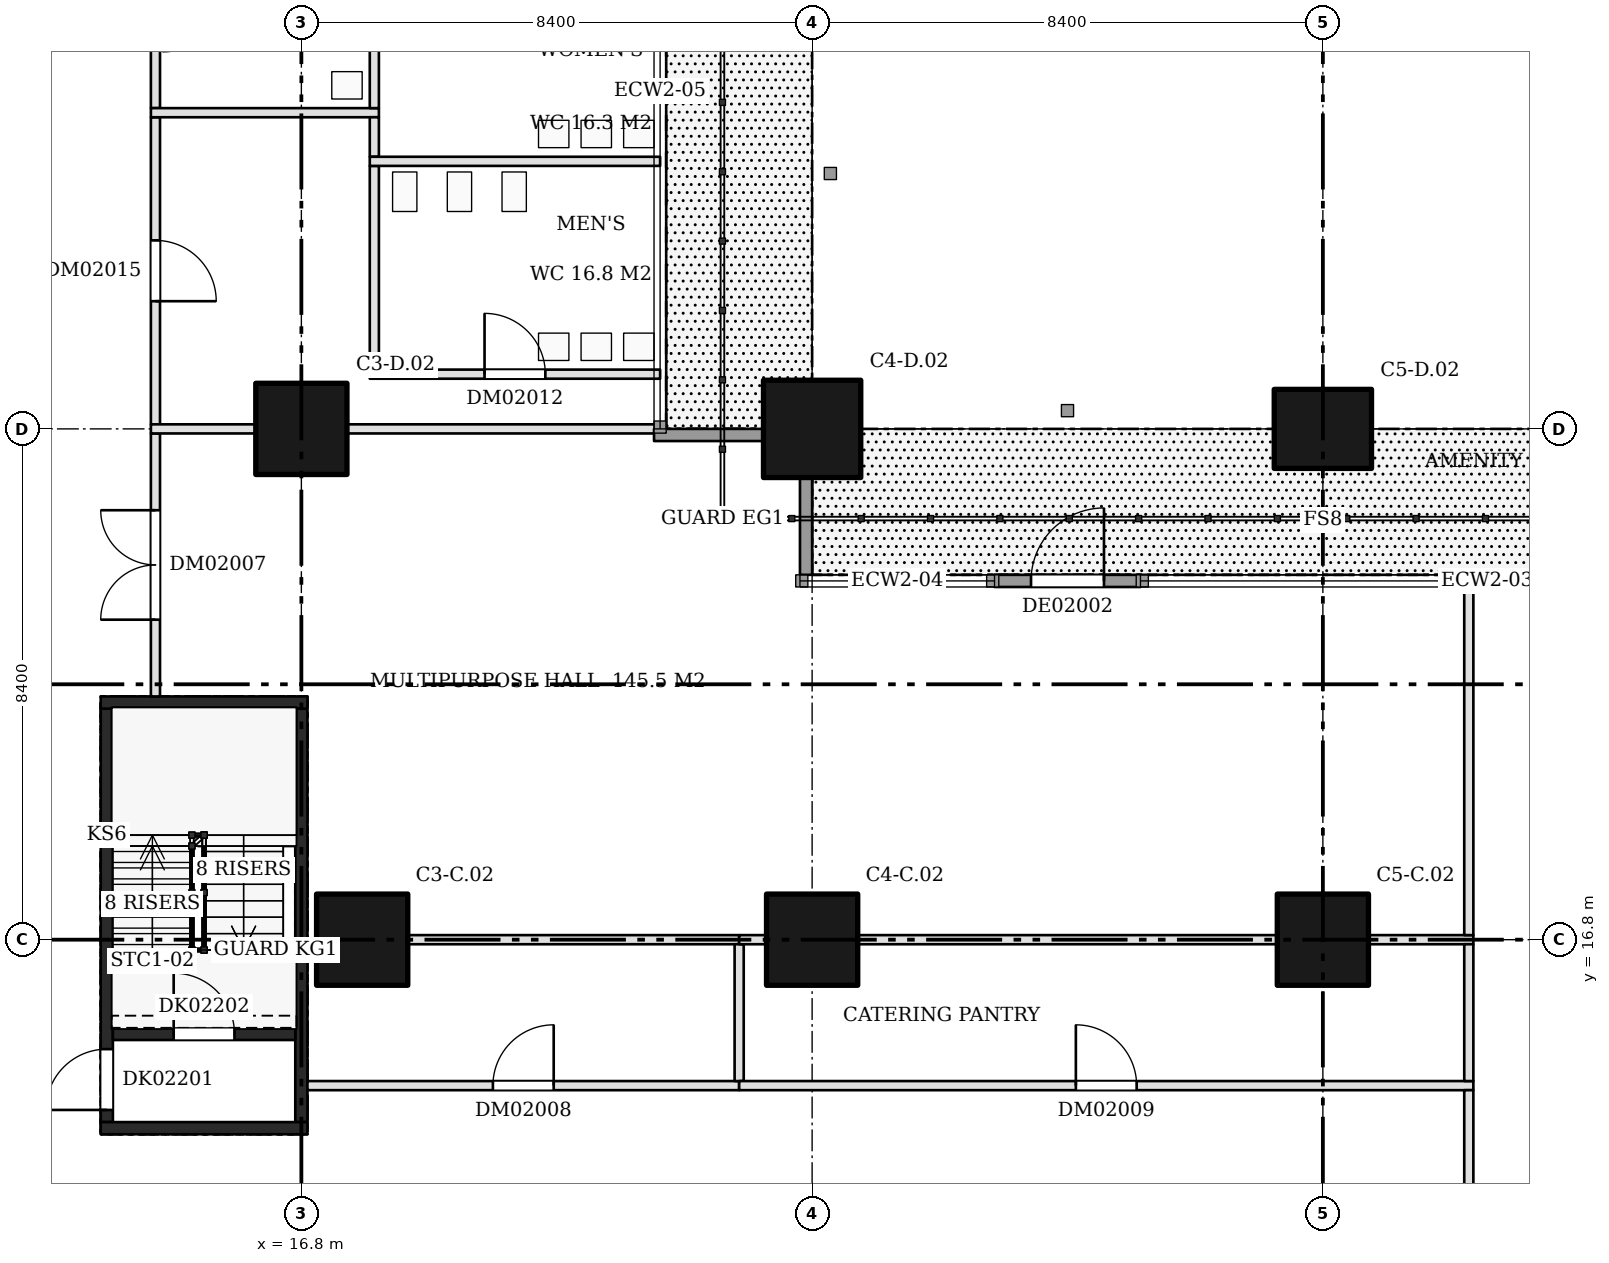
"""IFC4 building model, lengths in metres.
Left out: names, types, materials, properties, quantities, classifications, styles, units other than length and angle.
Written with IfcOpenShell. Run it as: python <this file> out.ifc"""

import sys

from ifc_helpers import new_model, si_unit, direction, frame, frame_2d, origin, origin_2d, place, context, subcontext, project, spatial, rectangle, extrude, element, fill, save


model = new_model("IFC4")
c1 = context("Model", 3, precision=1e-05, world=origin(), true_north=direction((0.0, 1.0)))
c2 = subcontext(c1, "Body", "Model", "MODEL_VIEW")
j1 = project(units=[si_unit("LENGTHUNIT", "METRE"), si_unit("PLANEANGLEUNIT", "RADIAN")], contexts=[c1])
p1 = place(None, origin())
s1 = spatial("IfcSite", under=j1, at=p1, CompositionType="ELEMENT")
p2 = place(p1, origin())
s2 = spatial("IfcBuilding", under=s1, at=p2, CompositionType="ELEMENT")
p3 = place(p2, frame((0.0, 0.0, 14.4)))
s3 = spatial("IfcBuildingStorey", under=s2, at=p3, CompositionType="ELEMENT", Elevation=14.4)
for number, where, z_axis, x_axis in (
    (1, (17.8, 16.8, 0.0), (0.0, 0.0, 1.0), (1.0, 0.0, 0.0)),
    (2, (16.8, 25.2, 0.0), (0.0, 0.0, 1.0), (1.0, 0.0, 0.0)),
    (3, (25.2, 16.8, 0.0), (0.0, 0.0, 1.0), (1.0, 0.0, 0.0)),
):
    element("IfcColumn", number, at=place(p3, frame(where, z_axis=z_axis, x_axis=x_axis)), inside=s3, PredefinedType="COLUMN", context=c2, shape_type="SweptSolid", body=[
        extrude(rectangle(XDim=1.5, YDim=1.5, at=origin_2d()), origin(), (0.0, 0.0, 1.0), 5.1),
    ])
p4 = place(p3, frame((25.2, 25.2, 0.0), z_axis=(0.0, 0.0, 1.0), x_axis=(1.0, 0.0, 0.0)))
e4 = element("IfcColumn", 4, at=p4, inside=s3, PredefinedType="COLUMN", context=c2, shape_type="SweptSolid", body=[
    extrude(rectangle(XDim=1.6, YDim=1.6, at=origin_2d()), origin(), (0.0, 0.0, 1.0), 5.1),
])
p5 = place(p3, frame((33.6, 16.8, 0.0), z_axis=(0.0, 0.0, 1.0), x_axis=(1.0, 0.0, 0.0)))
e5 = element("IfcColumn", 5, at=p5, inside=s3, PredefinedType="COLUMN", context=c2, shape_type="SweptSolid", body=[
    extrude(rectangle(XDim=1.5, YDim=1.5, at=origin_2d()), origin(), (0.0, 0.0, 1.0), 5.1),
])
p6 = place(p3, frame((33.6, 25.2, 0.0), z_axis=(0.0, 0.0, 1.0), x_axis=(1.0, 0.0, 0.0)))
e6 = element("IfcColumn", 6, at=p6, inside=s3, PredefinedType="COLUMN", context=c2, shape_type="SweptSolid", body=[
    extrude(rectangle(XDim=1.6, YDim=1.3, at=origin_2d()), origin(), (0.0, 0.0, 1.0), 5.1),
])
p7 = place(p3, frame((13.6, 13.8, 0.0), z_axis=(0.0, 0.0, 1.0), x_axis=(0.0, 1.0, 0.0)))
e7 = element("IfcWall", 7, at=p7, inside=s3, PredefinedType="SHEAR", context=c2, shape_type="SweptSolid", body=[
    extrude(rectangle(XDim=6.8, YDim=0.2, at=frame_2d((3.4, 0.0))), origin(), (0.0, 0.0, 1.0), 5.1),
])
p8 = place(p7, frame((0.2, 0.0, 0.0)))
e8 = element("IfcOpeningElement", 8, at=p8, cuts=e7, PredefinedType="OPENING", context=c2, shape_type="SweptSolid", body=[
    extrude(rectangle(XDim=1.0, YDim=2.1, at=frame_2d((0.5, 1.05))), frame((0.0, 0.11, 0.0), z_axis=(0.0, -1.0, 0.0), x_axis=(1.0, 0.0, 0.0)), (0.0, 0.0, 1.0), 0.22),
])
p9 = place(p3, frame((16.8, 13.8, 0.0), z_axis=(0.0, 0.0, 1.0), x_axis=(0.0, 1.0, 0.0)))
e9 = element("IfcWall", 9, at=p9, inside=s3, PredefinedType="SHEAR", context=c2, shape_type="SweptSolid", body=[
    extrude(rectangle(XDim=6.8, YDim=0.2, at=frame_2d((3.4, 0.0))), origin(), (0.0, 0.0, 1.0), 5.1),
])
for number, where, z_axis, x_axis in (
    (10, (13.5, 13.7, 0.0), (0.0, 0.0, 1.0), (1.0, 0.0, 0.0)),
    (11, (13.5, 20.7, 0.0), (0.0, 0.0, 1.0), (1.0, 0.0, 0.0)),
):
    element("IfcWall", number, at=place(p3, frame(where, z_axis=z_axis, x_axis=x_axis)), inside=s3, PredefinedType="SHEAR", context=c2, shape_type="SweptSolid", body=[
        extrude(rectangle(XDim=3.4, YDim=0.2, at=frame_2d((1.7, 0.0))), origin(), (0.0, 0.0, 1.0), 5.1),
    ])
p10 = place(p3, frame((13.7, 15.25, 0.0), z_axis=(0.0, 0.0, 1.0), x_axis=(1.0, 0.0, 0.0)))
e12 = element("IfcWall", 12, at=p10, inside=s3, PredefinedType="SHEAR", context=c2, shape_type="SweptSolid", body=[
    extrude(rectangle(XDim=3.0, YDim=0.2, at=frame_2d((1.5, 0.0))), origin(), (0.0, 0.0, 1.0), 5.1),
])
p11 = place(p10, frame((1.0, 0.0, 0.0)))
e13 = element("IfcOpeningElement", 13, at=p11, cuts=e12, PredefinedType="OPENING", context=c2, shape_type="SweptSolid", body=[
    extrude(rectangle(XDim=1.0, YDim=2.1, at=frame_2d((0.5, 1.05))), frame((0.0, 0.11, 0.0), z_axis=(0.0, -1.0, 0.0), x_axis=(1.0, 0.0, 0.0)), (0.0, 0.0, 1.0), 0.22),
])
p12 = place(p3, frame((14.4, 20.8, 0.0), z_axis=(0.0, 0.0, 1.0), x_axis=(0.0, 1.0, 0.0)))
e14 = element("IfcWall", 14, at=p12, inside=s3, PredefinedType="PARTITIONING", context=c2, shape_type="SweptSolid", body=[
    extrude(rectangle(XDim=4.325, YDim=0.15, at=frame_2d((2.163, 0.0))), origin(), (0.0, 0.0, 1.0), 5.1),
])
p13 = place(p12, frame((1.262, 0.0, 0.0)))
e15 = element("IfcOpeningElement", 15, at=p13, cuts=e14, PredefinedType="OPENING", context=c2, shape_type="SweptSolid", body=[
    extrude(rectangle(XDim=1.8, YDim=2.1, at=frame_2d((0.9, 1.05))), frame((0.0, 0.085, 0.0), z_axis=(0.0, -1.0, 0.0), x_axis=(1.0, 0.0, 0.0)), (0.0, 0.0, 1.0), 0.17),
])
p14 = place(p3, frame((14.4, 25.275, 0.0), z_axis=(0.0, 0.0, 1.0), x_axis=(0.0, 1.0, 0.0)))
e16 = element("IfcWall", 16, at=p14, inside=s3, PredefinedType="PARTITIONING", context=c2, shape_type="SweptSolid", body=[
    extrude(rectangle(XDim=5.05, YDim=0.15, at=frame_2d((2.525, 0.0))), origin(), (0.0, 0.0, 1.0), 5.1),
])
p15 = place(p14, frame((2.025, 0.0, 0.0)))
e17 = element("IfcOpeningElement", 17, at=p15, cuts=e16, PredefinedType="OPENING", context=c2, shape_type="SweptSolid", body=[
    extrude(rectangle(XDim=1.0, YDim=2.1, at=frame_2d((0.5, 1.05))), frame((0.0, 0.085, 0.0), z_axis=(0.0, -1.0, 0.0), x_axis=(1.0, 0.0, 0.0)), (0.0, 0.0, 1.0), 0.17),
])
p16 = place(p3, frame((14.325, 25.2, 0.0), z_axis=(0.0, 0.0, 1.0), x_axis=(1.0, 0.0, 0.0)))
e18 = element("IfcWall", 18, at=p16, inside=s3, PredefinedType="PARTITIONING", context=c2, shape_type="SweptSolid", body=[
    extrude(rectangle(XDim=1.725, YDim=0.15, at=frame_2d((0.863, 0.0))), origin(), (0.0, 0.0, 1.0), 5.1),
])
p17 = place(p3, frame((17.55, 25.2, 0.0), z_axis=(0.0, 0.0, 1.0), x_axis=(1.0, 0.0, 0.0)))
e19 = element("IfcWall", 19, at=p17, inside=s3, PredefinedType="PARTITIONING", context=c2, shape_type="SweptSolid", body=[
    extrude(rectangle(XDim=5.15, YDim=0.15, at=frame_2d((2.575, 0.0))), origin(), (0.0, 0.0, 1.0), 5.1),
])
p18 = place(p3, frame((14.4, 30.475, 0.0), z_axis=(0.0, 0.0, 1.0), x_axis=(0.0, 1.0, 0.0)))
e20 = element("IfcWall", 20, at=p18, inside=s3, PredefinedType="PARTITIONING", context=c2, shape_type="SweptSolid", body=[
    extrude(rectangle(XDim=1.85, YDim=0.15, at=frame_2d((0.925, 0.0))), origin(), (0.0, 0.0, 1.0), 5.1),
])
p19 = place(p3, frame((14.325, 30.4, 0.0), z_axis=(0.0, 0.0, 1.0), x_axis=(1.0, 0.0, 0.0)))
e21 = element("IfcWall", 21, at=p19, inside=s3, PredefinedType="PARTITIONING", context=c2, shape_type="SweptSolid", body=[
    extrude(rectangle(XDim=3.75, YDim=0.15, at=frame_2d((1.875, 0.0))), origin(), (0.0, 0.0, 1.0), 5.1),
])
p20 = place(p3, frame((16.9, 14.4, 0.0), z_axis=(0.0, 0.0, 1.0), x_axis=(1.0, 0.0, 0.0)))
e22 = element("IfcWall", 22, at=p20, inside=s3, PredefinedType="PARTITIONING", context=c2, shape_type="SweptSolid", body=[
    extrude(rectangle(XDim=7.1, YDim=0.15, at=frame_2d((3.55, 0.0))), origin(), (0.0, 0.0, 1.0), 5.1),
])
p21 = place(p20, frame((3.05, 0.0, 0.0)))
e23 = element("IfcOpeningElement", 23, at=p21, cuts=e22, PredefinedType="OPENING", context=c2, shape_type="SweptSolid", body=[
    extrude(rectangle(XDim=1.0, YDim=2.1, at=frame_2d((0.5, 1.05))), frame((0.0, 0.085, 0.0), z_axis=(0.0, -1.0, 0.0), x_axis=(1.0, 0.0, 0.0)), (0.0, 0.0, 1.0), 0.17),
])
p22 = place(p3, frame((18.55, 16.8, 0.0), z_axis=(0.0, 0.0, 1.0), x_axis=(1.0, 0.0, 0.0)))
e24 = element("IfcWall", 24, at=p22, inside=s3, PredefinedType="PARTITIONING", context=c2, shape_type="SweptSolid", body=[
    extrude(rectangle(XDim=5.45, YDim=0.15, at=frame_2d((2.725, 0.0))), origin(), (0.0, 0.0, 1.0), 5.1),
])
p23 = place(p3, frame((18.0, 26.175, 0.0), z_axis=(0.0, 0.0, 1.0), x_axis=(0.0, 1.0, 0.0)))
e25 = element("IfcWall", 25, at=p23, inside=s3, PredefinedType="PARTITIONING", context=c2, shape_type="SweptSolid", body=[
    extrude(rectangle(XDim=3.35, YDim=0.15, at=frame_2d((1.675, 0.0))), origin(), (0.0, 0.0, 1.0), 5.1),
])
p24 = place(p3, frame((17.925, 26.1, 0.0), z_axis=(0.0, 0.0, 1.0), x_axis=(1.0, 0.0, 0.0)))
e26 = element("IfcWall", 26, at=p24, inside=s3, PredefinedType="PARTITIONING", context=c2, shape_type="SweptSolid", body=[
    extrude(rectangle(XDim=4.775, YDim=0.15, at=frame_2d((2.387, 0.0))), origin(), (0.0, 0.0, 1.0), 5.1),
])
p25 = place(p24, frame((1.887, 0.0, 0.0)))
e27 = element("IfcOpeningElement", 27, at=p25, cuts=e26, PredefinedType="OPENING", context=c2, shape_type="SweptSolid", body=[
    extrude(rectangle(XDim=1.0, YDim=2.1, at=frame_2d((0.5, 1.05))), frame((0.0, 0.085, 0.0), z_axis=(0.0, -1.0, 0.0), x_axis=(1.0, 0.0, 0.0)), (0.0, 0.0, 1.0), 0.17),
])
p26 = place(p3, frame((18.0, 29.675, 0.0), z_axis=(0.0, 0.0, 1.0), x_axis=(0.0, 1.0, 0.0)))
e28 = element("IfcWall", 28, at=p26, inside=s3, PredefinedType="PARTITIONING", context=c2, shape_type="SweptSolid", body=[
    extrude(rectangle(XDim=0.65, YDim=0.15, at=frame_2d((0.325, 0.0))), origin(), (0.0, 0.0, 1.0), 5.1),
])
p27 = place(p3, frame((17.925, 29.6, 0.0), z_axis=(0.0, 0.0, 1.0), x_axis=(1.0, 0.0, 0.0)))
e29 = element("IfcWall", 29, at=p27, inside=s3, PredefinedType="PARTITIONING", context=c2, shape_type="SweptSolid", body=[
    extrude(rectangle(XDim=4.775, YDim=0.15, at=frame_2d((2.387, 0.0))), origin(), (0.0, 0.0, 1.0), 5.1),
])
p28 = place(p3, frame((18.0, 30.475, 0.0), z_axis=(0.0, 0.0, 1.0), x_axis=(0.0, 1.0, 0.0)))
e30 = element("IfcWall", 30, at=p28, inside=s3, PredefinedType="PARTITIONING", context=c2, shape_type="SweptSolid", body=[
    extrude(rectangle(XDim=1.85, YDim=0.15, at=frame_2d((0.925, 0.0))), origin(), (0.0, 0.0, 1.0), 5.1),
])
p29 = place(p3, frame((24.0, 14.475, 0.0), z_axis=(0.0, 0.0, 1.0), x_axis=(0.0, 1.0, 0.0)))
e31 = element("IfcWall", 31, at=p29, inside=s3, PredefinedType="PARTITIONING", context=c2, shape_type="SweptSolid", body=[
    extrude(rectangle(XDim=2.25, YDim=0.15, at=frame_2d((1.125, 0.0))), origin(), (0.0, 0.0, 1.0), 5.1),
])
p30 = place(p3, frame((24.0, 14.4, 0.0), z_axis=(0.0, 0.0, 1.0), x_axis=(1.0, 0.0, 0.0)))
e32 = element("IfcWall", 32, at=p30, inside=s3, PredefinedType="PARTITIONING", context=c2, shape_type="SweptSolid", body=[
    extrude(rectangle(XDim=12.075, YDim=0.15, at=frame_2d((6.038, 0.0))), origin(), (0.0, 0.0, 1.0), 5.1),
])
p31 = place(p30, frame((5.538, 0.0, 0.0)))
e33 = element("IfcOpeningElement", 33, at=p31, cuts=e32, PredefinedType="OPENING", context=c2, shape_type="SweptSolid", body=[
    extrude(rectangle(XDim=1.0, YDim=2.1, at=frame_2d((0.5, 1.05))), frame((0.0, 0.085, 0.0), z_axis=(0.0, -1.0, 0.0), x_axis=(1.0, 0.0, 0.0)), (0.0, 0.0, 1.0), 0.17),
])
p32 = place(p3, frame((24.0, 16.8, 0.0), z_axis=(0.0, 0.0, 1.0), x_axis=(1.0, 0.0, 0.0)))
e34 = element("IfcWall", 34, at=p32, inside=s3, PredefinedType="PARTITIONING", context=c2, shape_type="SweptSolid", body=[
    extrude(rectangle(XDim=0.45, YDim=0.15, at=frame_2d((0.225, 0.0))), origin(), (0.0, 0.0, 1.0), 5.1),
])
p33 = place(p3, frame((25.95, 16.8, 0.0), z_axis=(0.0, 0.0, 1.0), x_axis=(1.0, 0.0, 0.0)))
e35 = element("IfcWall", 35, at=p33, inside=s3, PredefinedType="PARTITIONING", context=c2, shape_type="SweptSolid", body=[
    extrude(rectangle(XDim=6.9, YDim=0.15, at=frame_2d((3.45, 0.0))), origin(), (0.0, 0.0, 1.0), 5.1),
])
p34 = place(p3, frame((34.35, 16.8, 0.0), z_axis=(0.0, 0.0, 1.0), x_axis=(1.0, 0.0, 0.0)))
e36 = element("IfcWall", 36, at=p34, inside=s3, PredefinedType="PARTITIONING", context=c2, shape_type="SweptSolid", body=[
    extrude(rectangle(XDim=1.725, YDim=0.15, at=frame_2d((0.862, 0.0))), origin(), (0.0, 0.0, 1.0), 5.1),
])
p35 = place(p3, frame((36.0, 10.875, 0.0), z_axis=(0.0, 0.0, 1.0), x_axis=(0.0, 1.0, 0.0)))
e37 = element("IfcWall", 37, at=p35, inside=s3, PredefinedType="PARTITIONING", context=c2, shape_type="SweptSolid", body=[
    extrude(rectangle(XDim=3.45, YDim=0.15, at=frame_2d((1.725, 0.0))), origin(), (0.0, 0.0, 1.0), 5.1),
])
p36 = place(p3, frame((36.0, 14.475, 0.0), z_axis=(0.0, 0.0, 1.0), x_axis=(0.0, 1.0, 0.0)))
e38 = element("IfcWall", 38, at=p36, inside=s3, PredefinedType="PARTITIONING", context=c2, shape_type="SweptSolid", body=[
    extrude(rectangle(XDim=2.25, YDim=0.15, at=frame_2d((1.125, 0.0))), origin(), (0.0, 0.0, 1.0), 5.1),
])
p37 = place(p3, frame((36.0, 16.875, 0.0), z_axis=(0.0, 0.0, 1.0), x_axis=(0.0, 1.0, 0.0)))
e39 = element("IfcWall", 39, at=p37, inside=s3, PredefinedType="PARTITIONING", context=c2, shape_type="SweptSolid", body=[
    extrude(rectangle(XDim=5.825, YDim=0.15, at=frame_2d((2.913, 0.0))), origin(), (0.0, 0.0, 1.0), 5.1),
])
p38 = place(p3, frame((30.6, 22.7, 0.0), z_axis=(0.0, 0.0, 1.0), x_axis=(-1.0, 0.0, 0.0)))
e40 = element("IfcWall", 40, at=p38, inside=s3, PredefinedType="SOLIDWALL", context=c2, shape_type="SweptSolid", body=[
    extrude(rectangle(XDim=2.4, YDim=0.2, at=frame_2d((1.2, 0.0))), origin(), (0.0, 0.0, 1.0), 5.1),
])
p39 = place(p38, frame((0.6, 0.0, 0.0)))
e41 = element("IfcOpeningElement", 41, at=p39, cuts=e40, PredefinedType="OPENING", context=c2, shape_type="SweptSolid", body=[
    extrude(rectangle(XDim=1.2, YDim=2.4, at=frame_2d((0.6, 1.2))), frame((0.0, 0.11, 0.0), z_axis=(0.0, -1.0, 0.0), x_axis=(1.0, 0.0, 0.0)), (0.0, 0.0, 1.0), 0.22),
])
p40 = place(p3, frame((25.1, 22.8, 0.0), z_axis=(0.0, 0.0, 1.0), x_axis=(0.0, 1.0, 0.0)))
e42 = element("IfcWall", 42, at=p40, inside=s3, PredefinedType="SOLIDWALL", context=c2, shape_type="SweptSolid", body=[
    extrude(rectangle(XDim=1.6, YDim=0.2, at=frame_2d((0.8, 0.0))), origin(), (0.0, 0.0, 1.0), 5.1),
])
p41 = place(p3, frame((24.4, 25.1, 0.0), z_axis=(0.0, 0.0, 1.0), x_axis=(-1.0, 0.0, 0.0)))
e43 = element("IfcWall", 43, at=p41, inside=s3, PredefinedType="SOLIDWALL", context=c2, shape_type="SweptSolid", body=[
    extrude(rectangle(XDim=1.8, YDim=0.2, at=frame_2d((0.9, 0.0))), origin(), (0.0, 0.0, 1.0), 5.1),
])
p42 = place(p8, origin())
e44 = element("IfcDoor", 44, at=p42, inside=s3, OperationType="SINGLE_SWING_LEFT", PredefinedType="DOOR", context=c2, shape_type="SweptSolid", body=[
    extrude(rectangle(XDim=1.0, YDim=2.1, at=frame_2d((0.5, 1.05))), frame((0.0, 0.025, 0.0), z_axis=(0.0, -1.0, 0.0), x_axis=(1.0, 0.0, 0.0)), (0.0, 0.0, 1.0), 0.05),
])
fill(e8, e44)
p43 = place(p11, origin())
e45 = element("IfcDoor", 45, at=p43, inside=s3, OperationType="SINGLE_SWING_LEFT", PredefinedType="DOOR", context=c2, shape_type="SweptSolid", body=[
    extrude(rectangle(XDim=1.0, YDim=2.1, at=frame_2d((0.5, 1.05))), frame((0.0, 0.025, 0.0), z_axis=(0.0, -1.0, 0.0), x_axis=(1.0, 0.0, 0.0)), (0.0, 0.0, 1.0), 0.05),
])
fill(e13, e45)
p44 = place(p13, origin())
e46 = element("IfcDoor", 46, at=p44, inside=s3, OperationType="DOUBLE_DOOR_SINGLE_SWING", PredefinedType="DOOR", context=c2, shape_type="SweptSolid", body=[
    extrude(rectangle(XDim=1.8, YDim=2.1, at=frame_2d((0.9, 1.05))), frame((0.0, 0.025, 0.0), z_axis=(0.0, -1.0, 0.0), x_axis=(1.0, 0.0, 0.0)), (0.0, 0.0, 1.0), 0.05),
])
fill(e15, e46)
p45 = place(p21, origin())
e47 = element("IfcDoor", 47, at=p45, inside=s3, OperationType="SINGLE_SWING_RIGHT", PredefinedType="DOOR", context=c2, shape_type="SweptSolid", body=[
    extrude(rectangle(XDim=1.0, YDim=2.1, at=frame_2d((0.5, 1.05))), frame((0.0, 0.025, 0.0), z_axis=(0.0, -1.0, 0.0), x_axis=(1.0, 0.0, 0.0)), (0.0, 0.0, 1.0), 0.05),
])
fill(e23, e47)
p46 = place(p31, origin())
e48 = element("IfcDoor", 48, at=p46, inside=s3, OperationType="SINGLE_SWING_LEFT", PredefinedType="DOOR", context=c2, shape_type="SweptSolid", body=[
    extrude(rectangle(XDim=1.0, YDim=2.1, at=frame_2d((0.5, 1.05))), frame((0.0, 0.025, 0.0), z_axis=(0.0, -1.0, 0.0), x_axis=(1.0, 0.0, 0.0)), (0.0, 0.0, 1.0), 0.05),
])
fill(e33, e48)
p47 = place(p25, origin())
e49 = element("IfcDoor", 49, at=p47, inside=s3, OperationType="SINGLE_SWING_LEFT", PredefinedType="DOOR", context=c2, shape_type="SweptSolid", body=[
    extrude(rectangle(XDim=1.0, YDim=2.1, at=frame_2d((0.5, 1.05))), frame((0.0, 0.025, 0.0), z_axis=(0.0, -1.0, 0.0), x_axis=(1.0, 0.0, 0.0)), (0.0, 0.0, 1.0), 0.05),
])
fill(e27, e49)
p48 = place(p15, frame((1.0, 0.0, 0.0), z_axis=(0.0, 0.0, 1.0), x_axis=(-1.0, 0.0, 0.0)))
e50 = element("IfcDoor", 50, at=p48, inside=s3, OperationType="SINGLE_SWING_RIGHT", PredefinedType="DOOR", context=c2, shape_type="SweptSolid", body=[
    extrude(rectangle(XDim=1.0, YDim=2.1, at=frame_2d((0.5, 1.05))), frame((0.0, 0.025, 0.0), z_axis=(0.0, -1.0, 0.0), x_axis=(1.0, 0.0, 0.0)), (0.0, 0.0, 1.0), 0.05),
])
fill(e17, e50)
p49 = place(p39, frame((1.2, 0.0, 0.0), z_axis=(0.0, 0.0, 1.0), x_axis=(-1.0, 0.0, 0.0)))
e51 = element("IfcDoor", 51, at=p49, inside=s3, OperationType="SINGLE_SWING_RIGHT", PredefinedType="DOOR", context=c2, shape_type="SweptSolid", body=[
    extrude(rectangle(XDim=1.2, YDim=2.4, at=frame_2d((0.6, 1.2))), frame((0.0, 0.025, 0.0), z_axis=(0.0, -1.0, 0.0), x_axis=(1.0, 0.0, 0.0)), (0.0, 0.0, 1.0), 0.05),
])
fill(e41, e51)
save(model, sys.argv[1])
